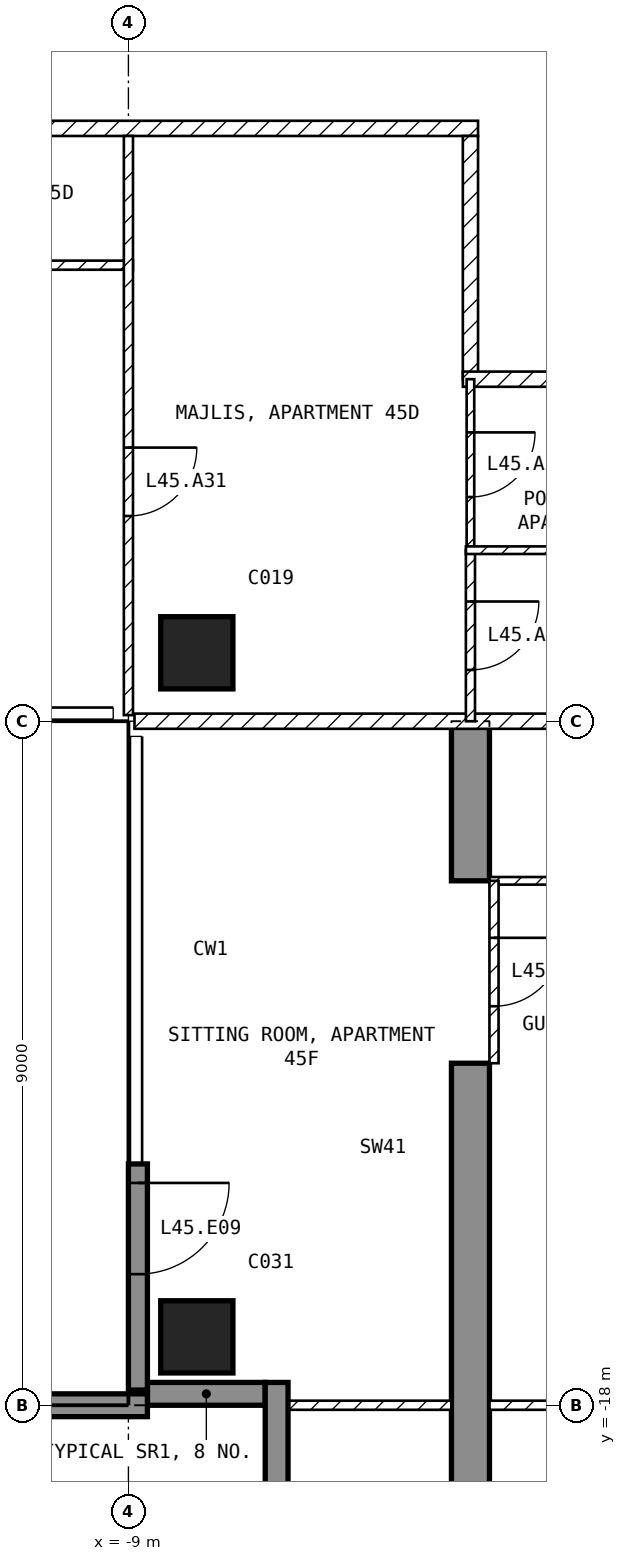
"""IFC4 building model, lengths in metres.
Left out: names, types, materials, properties, quantities, classifications, styles, units other than length and angle.
Written with IfcOpenShell. Run it as: python <this file> out.ifc"""

import sys

from ifc_helpers import new_model, si_unit, direction, frame, frame_2d, origin, origin_2d, place, context, subcontext, project, spatial, polyline, rectangle, outline, extrude, element, fill, save


model = new_model("IFC4")
c1 = context("Model", 3, precision=1e-05, world=origin(), true_north=direction((0.0, 1.0)))
c2 = subcontext(c1, "Body", "Model", "MODEL_VIEW")
j1 = project(units=[si_unit("LENGTHUNIT", "METRE"), si_unit("PLANEANGLEUNIT", "RADIAN")], contexts=[c1])
p1 = place(None, origin())
s1 = spatial("IfcSite", under=j1, at=p1, CompositionType="ELEMENT")
p2 = place(p1, origin())
s2 = spatial("IfcBuilding", under=s1, at=p2, CompositionType="ELEMENT")
p3 = place(p2, frame((0.0, 0.0, 184.1)))
s3 = spatial("IfcBuildingStorey", under=s2, at=p3, CompositionType="ELEMENT", Elevation=184.1)
for number, where, z_axis, x_axis in (
    (1, (-8.1, -17.1, -0.25), (0.0, 0.0, 1.0), (1.0, 0.0, 0.0)),
    (2, (-8.1, -8.1, -0.25), (0.0, 0.0, 1.0), (1.0, 0.0, 0.0)),
):
    element("IfcColumn", number, at=place(p3, frame(where, z_axis=z_axis, x_axis=x_axis)), inside=s3, PredefinedType="COLUMN", context=c2, shape_type="SweptSolid", body=[
        extrude(rectangle(XDim=0.95, YDim=0.95, at=origin_2d()), origin(), (0.0, 0.0, 1.0), 3.5),
    ])
p4 = place(p3, frame((-4.75, -20.225, -0.25), z_axis=(1.0, 0.0, 0.0), x_axis=(0.0, 1.0, 0.0)))
e3 = element("IfcWall", 3, at=p4, inside=s3, PredefinedType="SHEAR", context=c2, shape_type="SweptSolid", body=[
    extrude(outline(polyline([(0.0, 0.0), (6.725, 0.0), (6.725, 2.65), (9.125, 2.65), (9.125, 0.0), (11.225, 0.0), (11.225, 3.5), (0.0, 3.5), (0.0, 0.0)])), origin(), (0.0, 0.0, 1.0), 0.5),
])
p5 = place(p3, frame((-8.875, -14.825, 0.0), z_axis=(0.0, 0.0, 1.0), x_axis=(0.0, -1.0, 0.0)))
e4 = element("IfcWall", 4, at=p5, inside=s3, PredefinedType="SOLIDWALL", context=c2, shape_type="SweptSolid", body=[
    extrude(rectangle(XDim=2.975, YDim=0.25, at=frame_2d((1.488, 0.0))), origin(), (0.0, 0.0, 1.0), 3.25),
])
p6 = place(p5, frame((0.25, 0.0, 0.0)))
e5 = element("IfcOpeningElement", 5, at=p6, cuts=e4, PredefinedType="OPENING", context=c2, shape_type="SweptSolid", body=[
    extrude(rectangle(XDim=1.2, YDim=2.4, at=frame_2d((0.6, 1.2))), frame((0.0, 0.135, 0.0), z_axis=(0.0, -1.0, 0.0), x_axis=(1.0, 0.0, 0.0)), (0.0, 0.0, 1.0), 0.27),
])
p7 = place(p3, frame((-8.75, -17.85, 0.0), z_axis=(0.0, 0.0, 1.0), x_axis=(1.0, 0.0, 0.0)))
e6 = element("IfcWall", 6, at=p7, inside=s3, PredefinedType="SOLIDWALL", context=c2, shape_type="SweptSolid", body=[
    extrude(rectangle(XDim=1.55, YDim=0.3, at=frame_2d((0.775, 0.0))), origin(), (0.0, 0.0, 1.0), 3.25),
])
p8 = place(p3, frame((-7.05, -17.7, 0.0), z_axis=(0.0, 0.0, 1.0), x_axis=(0.0, -1.0, 0.0)))
e7 = element("IfcWall", 7, at=p8, inside=s3, PredefinedType="SOLIDWALL", context=c2, shape_type="SweptSolid", body=[
    extrude(rectangle(XDim=1.8, YDim=0.3, at=frame_2d((0.9, 0.0))), origin(), (0.0, 0.0, 1.0), 3.25),
])
p9 = place(p3, frame((-8.75, -18.0, 0.0), z_axis=(0.0, 0.0, 1.0), x_axis=(-1.0, 0.0, 0.0)))
e8 = element("IfcWall", 8, at=p9, inside=s3, PredefinedType="SOLIDWALL", context=c2, shape_type="SweptSolid", body=[
    extrude(rectangle(XDim=2.95, YDim=0.3, at=frame_2d((1.475, 0.0))), origin(), (0.0, 0.0, 1.0), 3.25),
])
p10 = place(p3, frame((-4.4, -1.2, 0.0), z_axis=(0.0, 0.0, 1.0), x_axis=(-1.0, 0.0, 0.0)))
e9 = element("IfcWall", 9, at=p10, inside=s3, PredefinedType="PARTITIONING", context=c2, shape_type="SweptSolid", body=[
    extrude(rectangle(XDim=17.2, YDim=0.2, at=frame_2d((8.6, 0.0))), origin(), (0.0, 0.0, 1.0), 3.25),
])
p11 = place(p10, frame((12.35, 0.0, 0.0)))
e10 = element("IfcOpeningElement", 10, at=p11, cuts=e9, PredefinedType="OPENING", context=c2, shape_type="SweptSolid", body=[
    extrude(rectangle(XDim=1.0, YDim=2.1, at=frame_2d((0.5, 1.05))), frame((0.0, 0.11, 0.0), z_axis=(0.0, -1.0, 0.0), x_axis=(1.0, 0.0, 0.0)), (0.0, 0.0, 1.0), 0.22),
])
p12 = place(p3, frame((-4.5, -4.5, 0.0), z_axis=(0.0, 0.0, 1.0), x_axis=(0.0, 1.0, 0.0)))
e11 = element("IfcWall", 11, at=p12, inside=s3, PredefinedType="PARTITIONING", context=c2, shape_type="SweptSolid", body=[
    extrude(rectangle(XDim=3.2, YDim=0.2, at=frame_2d((1.6, 0.0))), origin(), (0.0, 0.0, 1.0), 3.25),
])
p13 = place(p3, frame((-1.1, -4.5, 0.0), z_axis=(0.0, 0.0, 1.0), x_axis=(-1.0, 0.0, 0.0)))
e12 = element("IfcWall", 12, at=p13, inside=s3, PredefinedType="PARTITIONING", context=c2, shape_type="SweptSolid", body=[
    extrude(rectangle(XDim=3.5, YDim=0.2, at=frame_2d((1.75, 0.0))), origin(), (0.0, 0.0, 1.0), 3.25),
])
p14 = place(p3, frame((8.92, -9.0, 0.0), z_axis=(0.0, 0.0, 1.0), x_axis=(-1.0, 0.0, 0.0)))
e13 = element("IfcWall", 13, at=p14, inside=s3, PredefinedType="PARTITIONING", context=c2, shape_type="SweptSolid", body=[
    extrude(rectangle(XDim=17.84, YDim=0.2, at=frame_2d((8.92, 0.0))), origin(), (0.0, 0.0, 1.0), 3.25),
])
p15 = place(p14, frame((8.42, 0.0, 0.0)))
e14 = element("IfcOpeningElement", 14, at=p15, cuts=e13, PredefinedType="OPENING", context=c2, shape_type="SweptSolid", body=[
    extrude(rectangle(XDim=1.0, YDim=2.1, at=frame_2d((0.5, 1.05))), frame((0.0, 0.11, 0.0), z_axis=(0.0, -1.0, 0.0), x_axis=(1.0, 0.0, 0.0)), (0.0, 0.0, 1.0), 0.22),
])
p16 = place(p3, frame((-8.94, -3.0, 0.0), z_axis=(0.0, 0.0, 1.0), x_axis=(-1.0, 0.0, 0.0)))
e15 = element("IfcWall", 15, at=p16, inside=s3, PredefinedType="PARTITIONING", context=c2, shape_type="SweptSolid", body=[
    extrude(rectangle(XDim=9.51, YDim=0.12, at=frame_2d((4.755, 0.0))), origin(), (0.0, 0.0, 1.0), 3.25),
])
p17 = place(p16, frame((2.01, 0.0, 0.0)))
e16 = element("IfcOpeningElement", 16, at=p17, cuts=e15, PredefinedType="OPENING", context=c2, shape_type="SweptSolid", body=[
    extrude(rectangle(XDim=0.9, YDim=2.1, at=frame_2d((0.45, 1.05))), frame((0.0, 0.07, 0.0), z_axis=(0.0, -1.0, 0.0), x_axis=(1.0, 0.0, 0.0)), (0.0, 0.0, 1.0), 0.14),
])
p18 = place(p16, frame((7.635, 0.0, 0.0)))
e17 = element("IfcOpeningElement", 17, at=p18, cuts=e15, PredefinedType="OPENING", context=c2, shape_type="SweptSolid", body=[
    extrude(rectangle(XDim=0.9, YDim=2.1, at=frame_2d((0.45, 1.05))), frame((0.0, 0.07, 0.0), z_axis=(0.0, -1.0, 0.0), x_axis=(1.0, 0.0, 0.0)), (0.0, 0.0, 1.0), 0.14),
])
p19 = place(p3, frame((-9.0, -1.3, 0.0), z_axis=(0.0, 0.0, 1.0), x_axis=(0.0, -1.0, 0.0)))
e18 = element("IfcWall", 18, at=p19, inside=s3, PredefinedType="PARTITIONING", context=c2, shape_type="SweptSolid", body=[
    extrude(rectangle(XDim=7.62, YDim=0.12, at=frame_2d((3.81, 0.0))), origin(), (0.0, 0.0, 1.0), 3.25),
])
p20 = place(p19, frame((4.1, 0.0, 0.0)))
e19 = element("IfcOpeningElement", 19, at=p20, cuts=e18, PredefinedType="OPENING", context=c2, shape_type="SweptSolid", body=[
    extrude(rectangle(XDim=0.9, YDim=2.1, at=frame_2d((0.45, 1.05))), frame((0.0, 0.07, 0.0), z_axis=(0.0, -1.0, 0.0), x_axis=(1.0, 0.0, 0.0)), (0.0, 0.0, 1.0), 0.14),
])
p21 = place(p3, frame((-4.5, -4.5, 0.0), z_axis=(0.0, 0.0, 1.0), x_axis=(0.0, -1.0, 0.0)))
e20 = element("IfcWall", 20, at=p21, inside=s3, PredefinedType="PARTITIONING", context=c2, shape_type="SweptSolid", body=[
    extrude(rectangle(XDim=2.25, YDim=0.1, at=frame_2d((1.125, 0.0))), origin(), (0.0, 0.0, 1.0), 3.25),
])
p22 = place(p21, frame((0.7, 0.0, 0.0)))
e21 = element("IfcOpeningElement", 21, at=p22, cuts=e20, PredefinedType="OPENING", context=c2, shape_type="SweptSolid", body=[
    extrude(rectangle(XDim=0.85, YDim=2.1, at=frame_2d((0.425, 1.05))), frame((0.0, 0.06, 0.0), z_axis=(0.0, -1.0, 0.0), x_axis=(1.0, 0.0, 0.0)), (0.0, 0.0, 1.0), 0.12),
])
p23 = place(p3, frame((-4.5, -6.75, 0.0), z_axis=(0.0, 0.0, 1.0), x_axis=(0.0, -1.0, 0.0)))
e22 = element("IfcWall", 22, at=p23, inside=s3, PredefinedType="PARTITIONING", context=c2, shape_type="SweptSolid", body=[
    extrude(rectangle(XDim=2.25, YDim=0.12, at=frame_2d((1.125, 0.0))), origin(), (0.0, 0.0, 1.0), 3.25),
])
p24 = place(p23, frame((0.675, 0.0, 0.0)))
e23 = element("IfcOpeningElement", 23, at=p24, cuts=e22, PredefinedType="OPENING", context=c2, shape_type="SweptSolid", body=[
    extrude(rectangle(XDim=0.9, YDim=2.1, at=frame_2d((0.45, 1.05))), frame((0.0, 0.07, 0.0), z_axis=(0.0, -1.0, 0.0), x_axis=(1.0, 0.0, 0.0)), (0.0, 0.0, 1.0), 0.14),
])
p25 = place(p3, frame((-1.1, -6.75, 0.0), z_axis=(0.0, 0.0, 1.0), x_axis=(-1.0, 0.0, 0.0)))
e24 = element("IfcWall", 24, at=p25, inside=s3, PredefinedType="PARTITIONING", context=c2, shape_type="SweptSolid", body=[
    extrude(rectangle(XDim=3.46, YDim=0.1, at=frame_2d((1.73, 0.0))), origin(), (0.0, 0.0, 1.0), 3.25),
])
p26 = place(p3, frame((-2.1, -11.1, 0.0), z_axis=(0.0, 0.0, 1.0), x_axis=(-1.0, 0.0, 0.0)))
e25 = element("IfcWall", 25, at=p26, inside=s3, PredefinedType="PARTITIONING", context=c2, shape_type="SweptSolid", body=[
    extrude(rectangle(XDim=2.15, YDim=0.1, at=frame_2d((1.075, 0.0))), origin(), (0.0, 0.0, 1.0), 3.25),
])
p27 = place(p3, frame((4.25, -18.0, 0.0), z_axis=(0.0, 0.0, 1.0), x_axis=(-1.0, 0.0, 0.0)))
e26 = element("IfcWall", 26, at=p27, inside=s3, PredefinedType="PARTITIONING", context=c2, shape_type="SweptSolid", body=[
    extrude(rectangle(XDim=8.5, YDim=0.12, at=frame_2d((4.25, 0.0))), origin(), (0.0, 0.0, 1.0), 3.25),
])
p28 = place(p27, frame((5.675, 0.0, 0.0)))
e27 = element("IfcOpeningElement", 27, at=p28, cuts=e26, PredefinedType="OPENING", context=c2, shape_type="SweptSolid", body=[
    extrude(rectangle(XDim=0.9, YDim=2.1, at=frame_2d((0.45, 1.05))), frame((0.0, 0.07, 0.0), z_axis=(0.0, -1.0, 0.0), x_axis=(1.0, 0.0, 0.0)), (0.0, 0.0, 1.0), 0.14),
])
p29 = place(p3, frame((-4.75, -18.0, 0.0), z_axis=(0.0, 0.0, 1.0), x_axis=(-1.0, 0.0, 0.0)))
e28 = element("IfcWall", 28, at=p29, inside=s3, PredefinedType="PARTITIONING", context=c2, shape_type="SweptSolid", body=[
    extrude(rectangle(XDim=2.37, YDim=0.12, at=frame_2d((1.185, 0.0))), origin(), (0.0, 0.0, 1.0), 3.25),
])
p30 = place(p3, frame((-4.19, -11.1, 0.0), z_axis=(0.0, 0.0, 1.0), x_axis=(0.0, -1.0, 0.0)))
e29 = element("IfcWall", 29, at=p30, inside=s3, PredefinedType="PARTITIONING", context=c2, shape_type="SweptSolid", body=[
    extrude(rectangle(XDim=2.4, YDim=0.12, at=frame_2d((1.2, 0.0))), origin(), (0.0, 0.0, 1.0), 2.4),
])
p31 = place(p30, frame((0.75, 0.0, 0.0)))
e30 = element("IfcOpeningElement", 30, at=p31, cuts=e29, PredefinedType="OPENING", context=c2, shape_type="SweptSolid", body=[
    extrude(rectangle(XDim=0.9, YDim=2.1, at=frame_2d((0.45, 1.05))), frame((0.0, 0.07, 0.0), z_axis=(0.0, -1.0, 0.0), x_axis=(1.0, 0.0, 0.0)), (0.0, 0.0, 1.0), 0.14),
])
p32 = place(p6, origin())
e31 = element("IfcDoor", 31, at=p32, inside=s3, OperationType="SINGLE_SWING_LEFT", PredefinedType="DOOR", context=c2, shape_type="SweptSolid", body=[
    extrude(rectangle(XDim=1.2, YDim=2.4, at=frame_2d((0.6, 1.2))), frame((0.0, 0.025, 0.0), z_axis=(0.0, -1.0, 0.0), x_axis=(1.0, 0.0, 0.0)), (0.0, 0.0, 1.0), 0.05),
])
fill(e5, e31)
p33 = place(p24, origin())
e32 = element("IfcDoor", 32, at=p33, inside=s3, OperationType="SINGLE_SWING_LEFT", PredefinedType="DOOR", context=c2, shape_type="SweptSolid", body=[
    extrude(rectangle(XDim=0.9, YDim=2.1, at=frame_2d((0.45, 1.05))), frame((0.0, 0.025, 0.0), z_axis=(0.0, -1.0, 0.0), x_axis=(1.0, 0.0, 0.0)), (0.0, 0.0, 1.0), 0.05),
])
fill(e23, e32)
p34 = place(p20, origin())
e33 = element("IfcDoor", 33, at=p34, inside=s3, OperationType="SINGLE_SWING_LEFT", PredefinedType="DOOR", context=c2, shape_type="SweptSolid", body=[
    extrude(rectangle(XDim=0.9, YDim=2.1, at=frame_2d((0.45, 1.05))), frame((0.0, 0.025, 0.0), z_axis=(0.0, -1.0, 0.0), x_axis=(1.0, 0.0, 0.0)), (0.0, 0.0, 1.0), 0.05),
])
fill(e19, e33)
p35 = place(p22, origin())
e34 = element("IfcDoor", 34, at=p35, inside=s3, OperationType="SINGLE_SWING_LEFT", PredefinedType="DOOR", context=c2, shape_type="SweptSolid", body=[
    extrude(rectangle(XDim=0.85, YDim=2.1, at=frame_2d((0.425, 1.05))), frame((0.0, 0.025, 0.0), z_axis=(0.0, -1.0, 0.0), x_axis=(1.0, 0.0, 0.0)), (0.0, 0.0, 1.0), 0.05),
])
fill(e21, e34)
p36 = place(p31, origin())
e35 = element("IfcDoor", 35, at=p36, inside=s3, OperationType="SINGLE_SWING_LEFT", PredefinedType="DOOR", context=c2, shape_type="SweptSolid", body=[
    extrude(rectangle(XDim=0.9, YDim=2.1, at=frame_2d((0.45, 1.05))), frame((0.0, 0.025, 0.0), z_axis=(0.0, -1.0, 0.0), x_axis=(1.0, 0.0, 0.0)), (0.0, 0.0, 1.0), 0.05),
])
fill(e30, e35)
save(model, sys.argv[1])
